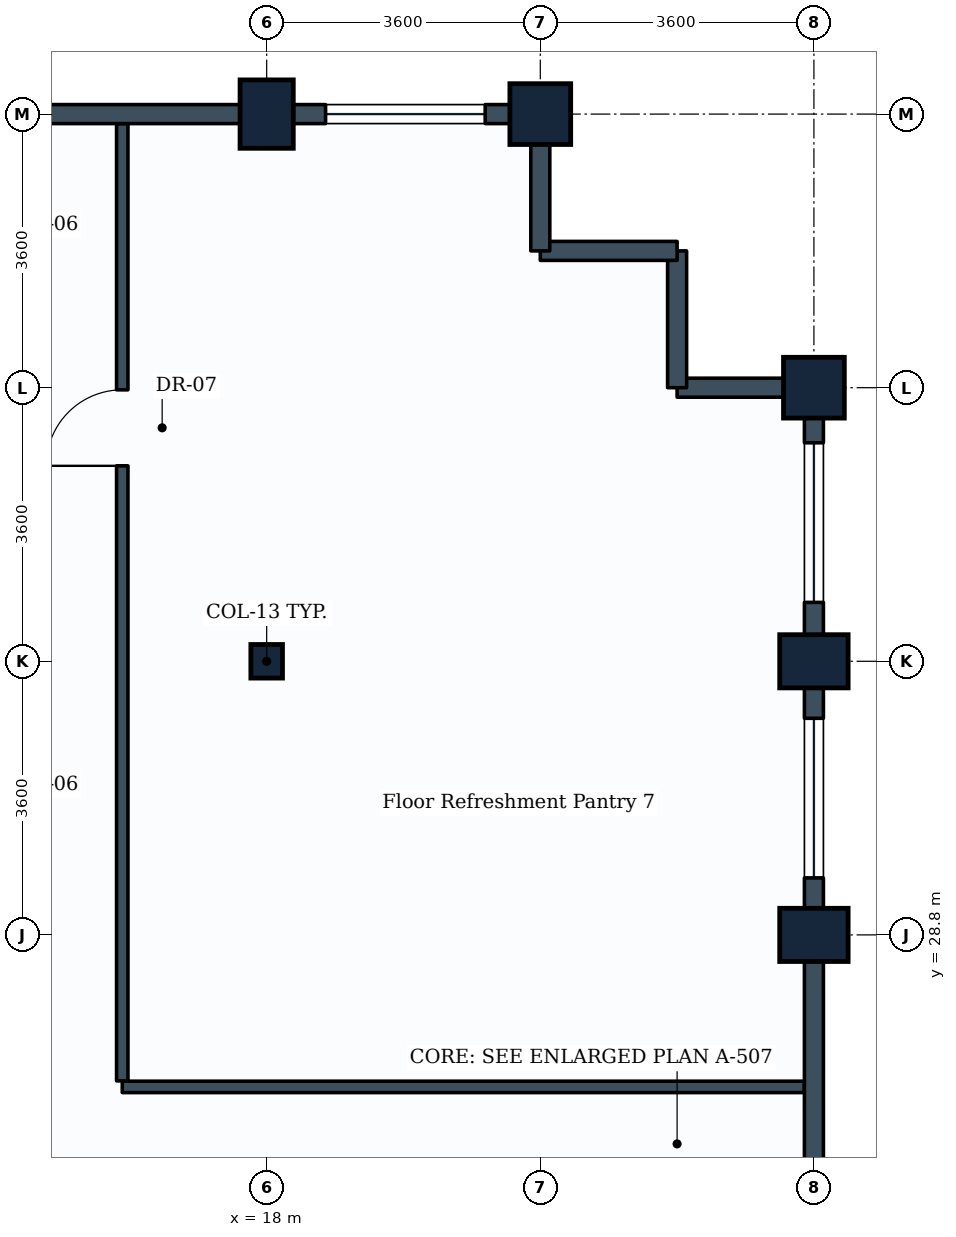
"""IFC4 building model, lengths in metres.
Left out: names, types, materials, properties, quantities, classifications, styles, units other than length and angle.
Written with IfcOpenShell. Run it as: python <this file> out.ifc"""

import sys

from ifc_helpers import new_model, si_unit, direction, frame, frame_2d, origin, origin_2d, place, context, subcontext, project, spatial, rectangle, i_section, extrude, element, fill, save


model = new_model("IFC4")
c1 = context("Model", 3, precision=1e-05, world=origin(), true_north=direction((0.0, 1.0)))
c2 = subcontext(c1, "Body", "Model", "MODEL_VIEW")
j1 = project(units=[si_unit("LENGTHUNIT", "METRE"), si_unit("PLANEANGLEUNIT", "RADIAN")], contexts=[c1])
p1 = place(None, origin())
s1 = spatial("IfcSite", under=j1, at=p1, CompositionType="ELEMENT")
p2 = place(p1, origin())
s2 = spatial("IfcBuilding", under=s1, at=p2, CompositionType="ELEMENT")
p3 = place(p2, frame((0.0, 0.0, 178.6)))
s3 = spatial("IfcBuildingStorey", under=s2, at=p3, CompositionType="ELEMENT", Elevation=178.6)
p4 = place(p3, frame((18.0, 32.4, 0.0), z_axis=(0.0, 0.0, 1.0), x_axis=(1.0, 0.0, 0.0)))
e1 = element("IfcColumn", 1, at=p4, inside=s3, PredefinedType="COLUMN", context=c2, shape_type="SweptSolid", body=[
    extrude(i_section(OverallWidth=0.416, OverallDepth=0.442, WebThickness=0.025, FlangeThickness=0.041, FilletRadius=0.015, at=origin_2d()), origin(), (0.0, 0.0, 1.0), 3.8),
])
p5 = place(p3, frame((18.0, 39.6, 0.0), z_axis=(0.0, 0.0, 1.0), x_axis=(1.0, 0.0, 0.0)))
e2 = element("IfcColumn", 2, at=p5, inside=s3, PredefinedType="COLUMN", context=c2, shape_type="SweptSolid", body=[
    extrude(rectangle(XDim=0.7, YDim=0.9, at=origin_2d()), origin(), (0.0, 0.0, 1.0), 3.8),
])
p6 = place(p3, frame((21.6, 39.6, 0.0), z_axis=(0.0, 0.0, 1.0), x_axis=(1.0, 0.0, 0.0)))
e3 = element("IfcColumn", 3, at=p6, inside=s3, PredefinedType="COLUMN", context=c2, shape_type="SweptSolid", body=[
    extrude(rectangle(XDim=0.8, YDim=0.8, at=origin_2d()), origin(), (0.0, 0.0, 1.0), 3.8),
])
for number, where, z_axis, x_axis in (
    (4, (25.2, 28.8, 0.0), (0.0, 0.0, 1.0), (0.0, 1.0, 0.0)),
    (5, (25.2, 32.4, 0.0), (0.0, 0.0, 1.0), (0.0, 1.0, 0.0)),
):
    element("IfcColumn", number, at=place(p3, frame(where, z_axis=z_axis, x_axis=x_axis)), inside=s3, PredefinedType="COLUMN", context=c2, shape_type="SweptSolid", body=[
        extrude(rectangle(XDim=0.7, YDim=0.9, at=origin_2d()), origin(), (0.0, 0.0, 1.0), 3.8),
    ])
p7 = place(p3, frame((25.2, 36.0, 0.0), z_axis=(0.0, 0.0, 1.0), x_axis=(0.0, 1.0, 0.0)))
e6 = element("IfcColumn", 6, at=p7, inside=s3, PredefinedType="COLUMN", context=c2, shape_type="SweptSolid", body=[
    extrude(rectangle(XDim=0.8, YDim=0.8, at=origin_2d()), origin(), (0.0, 0.0, 1.0), 3.8),
])
p8 = place(p3, frame((25.2, 25.2, 0.0), z_axis=(0.0, 0.0, 1.0), x_axis=(0.0, 1.0, 0.0)))
e7 = element("IfcWall", 7, at=p8, inside=s3, PredefinedType="STANDARD", context=c2, shape_type="SweptSolid", body=[
    extrude(rectangle(XDim=3.6, YDim=0.25, at=frame_2d((1.8, 0.0))), origin(), (0.0, 0.0, 1.0), 2.93),
])
p9 = place(p3, frame((25.2, 28.8, 0.0), z_axis=(0.0, 0.0, 1.0), x_axis=(0.0, 1.0, 0.0)))
e8 = element("IfcWall", 8, at=p9, inside=s3, PredefinedType="STANDARD", context=c2, shape_type="SweptSolid", body=[
    extrude(rectangle(XDim=3.6, YDim=0.25, at=frame_2d((1.8, 0.0))), origin(), (0.0, 0.0, 1.0), 2.93),
])
p10 = place(p9, frame((0.75, 0.0, 0.85)))
e9 = element("IfcOpeningElement", 9, at=p10, cuts=e8, PredefinedType="OPENING", context=c2, shape_type="SweptSolid", body=[
    extrude(rectangle(XDim=2.1, YDim=1.35, at=frame_2d((1.05, 0.675))), frame((0.0, 0.135, 0.0), z_axis=(0.0, -1.0, 0.0), x_axis=(1.0, 0.0, 0.0)), (0.0, 0.0, 1.0), 0.27),
])
p11 = place(p3, frame((25.2, 32.4, 0.0), z_axis=(0.0, 0.0, 1.0), x_axis=(0.0, 1.0, 0.0)))
e10 = element("IfcWall", 10, at=p11, inside=s3, PredefinedType="STANDARD", context=c2, shape_type="SweptSolid", body=[
    extrude(rectangle(XDim=3.6, YDim=0.25, at=frame_2d((1.8, 0.0))), origin(), (0.0, 0.0, 1.0), 2.93),
])
p12 = place(p11, frame((0.775, 0.0, 0.85)))
e11 = element("IfcOpeningElement", 11, at=p12, cuts=e10, PredefinedType="OPENING", context=c2, shape_type="SweptSolid", body=[
    extrude(rectangle(XDim=2.1, YDim=1.35, at=frame_2d((1.05, 0.675))), frame((0.0, 0.135, 0.0), z_axis=(0.0, -1.0, 0.0), x_axis=(1.0, 0.0, 0.0)), (0.0, 0.0, 1.0), 0.27),
])
p13 = place(p3, frame((23.4, 36.0, 0.0), z_axis=(0.0, 0.0, 1.0), x_axis=(1.0, 0.0, 0.0)))
e12 = element("IfcWall", 12, at=p13, inside=s3, PredefinedType="STANDARD", context=c2, shape_type="SweptSolid", body=[
    extrude(rectangle(XDim=1.8, YDim=0.25, at=frame_2d((0.9, 0.0))), origin(), (0.0, 0.0, 1.0), 2.93),
])
p14 = place(p3, frame((23.4, 36.0, 0.0), z_axis=(0.0, 0.0, 1.0), x_axis=(0.0, 1.0, 0.0)))
e13 = element("IfcWall", 13, at=p14, inside=s3, PredefinedType="STANDARD", context=c2, shape_type="SweptSolid", body=[
    extrude(rectangle(XDim=1.8, YDim=0.25, at=frame_2d((0.9, 0.0))), origin(), (0.0, 0.0, 1.0), 3.535),
])
p15 = place(p3, frame((21.6, 37.8, 0.0), z_axis=(0.0, 0.0, 1.0), x_axis=(1.0, 0.0, 0.0)))
e14 = element("IfcWall", 14, at=p15, inside=s3, PredefinedType="STANDARD", context=c2, shape_type="SweptSolid", body=[
    extrude(rectangle(XDim=1.8, YDim=0.25, at=frame_2d((0.9, 0.0))), origin(), (0.0, 0.0, 1.0), 3.535),
])
p16 = place(p3, frame((21.6, 37.8, 0.0), z_axis=(0.0, 0.0, 1.0), x_axis=(0.0, 1.0, 0.0)))
e15 = element("IfcWall", 15, at=p16, inside=s3, PredefinedType="STANDARD", context=c2, shape_type="SweptSolid", body=[
    extrude(rectangle(XDim=1.8, YDim=0.25, at=frame_2d((0.9, 0.0))), origin(), (0.0, 0.0, 1.0), 2.93),
])
p17 = place(p3, frame((18.0, 39.6, 0.0), z_axis=(0.0, 0.0, 1.0), x_axis=(1.0, 0.0, 0.0)))
e16 = element("IfcWall", 16, at=p17, inside=s3, PredefinedType="STANDARD", context=c2, shape_type="SweptSolid", body=[
    extrude(rectangle(XDim=3.6, YDim=0.25, at=frame_2d((1.8, 0.0))), origin(), (0.0, 0.0, 1.0), 2.93),
])
p18 = place(p17, frame((0.775, 0.0, 0.85)))
e17 = element("IfcOpeningElement", 17, at=p18, cuts=e16, PredefinedType="OPENING", context=c2, shape_type="SweptSolid", body=[
    extrude(rectangle(XDim=2.1, YDim=1.35, at=frame_2d((1.05, 0.675))), frame((0.0, 0.135, 0.0), z_axis=(0.0, -1.0, 0.0), x_axis=(1.0, 0.0, 0.0)), (0.0, 0.0, 1.0), 0.27),
])
p19 = place(p3, frame((14.4, 39.6, 0.0), z_axis=(0.0, 0.0, 1.0), x_axis=(1.0, 0.0, 0.0)))
e18 = element("IfcWall", 18, at=p19, inside=s3, PredefinedType="STANDARD", context=c2, shape_type="SweptSolid", body=[
    extrude(rectangle(XDim=3.6, YDim=0.25, at=frame_2d((1.8, 0.0))), origin(), (0.0, 0.0, 1.0), 2.93),
])
p20 = place(p3, frame((16.1, 26.8, 0.0), z_axis=(0.0, 0.0, 1.0), x_axis=(1.0, 0.0, 0.0)))
e19 = element("IfcWall", 19, at=p20, inside=s3, PredefinedType="PARTITIONING", context=c2, shape_type="SweptSolid", body=[
    extrude(rectangle(XDim=8.971, YDim=0.15, at=frame_2d((4.485, 0.0))), origin(), (0.0, 0.0, 1.0), 2.93),
])
p21 = place(p3, frame((16.1, 26.879, 0.0), z_axis=(0.0, 0.0, 1.0), x_axis=(0.0, 1.0, 0.0)))
e20 = element("IfcWall", 20, at=p21, inside=s3, PredefinedType="PARTITIONING", context=c2, shape_type="SweptSolid", body=[
    extrude(rectangle(XDim=12.592, YDim=0.15, at=frame_2d((6.296, 0.0))), origin(), (0.0, 0.0, 1.0), 2.93),
])
p22 = place(p21, frame((8.093, 0.0, 0.0)))
e21 = element("IfcOpeningElement", 21, at=p22, cuts=e20, PredefinedType="OPENING", context=c2, shape_type="SweptSolid", body=[
    extrude(rectangle(XDim=1.0, YDim=2.1, at=frame_2d((0.5, 1.05))), frame((0.0, 0.085, 0.0), z_axis=(0.0, -1.0, 0.0), x_axis=(1.0, 0.0, 0.0)), (0.0, 0.0, 1.0), 0.17),
])
p23 = place(p10, origin())
e22 = element("IfcWindow", 22, at=p23, inside=s3, PartitioningType="SINGLE_PANEL", PredefinedType="WINDOW", context=c2, shape_type="SweptSolid", body=[
    extrude(rectangle(XDim=2.1, YDim=1.35, at=frame_2d((1.05, 0.675))), frame((0.0, 0.03, 0.0), z_axis=(0.0, -1.0, 0.0), x_axis=(1.0, 0.0, 0.0)), (0.0, 0.0, 1.0), 0.06),
])
fill(e9, e22)
p24 = place(p12, origin())
e23 = element("IfcWindow", 23, at=p24, inside=s3, PartitioningType="SINGLE_PANEL", PredefinedType="WINDOW", context=c2, shape_type="SweptSolid", body=[
    extrude(rectangle(XDim=2.1, YDim=1.35, at=frame_2d((1.05, 0.675))), frame((0.0, 0.03, 0.0), z_axis=(0.0, -1.0, 0.0), x_axis=(1.0, 0.0, 0.0)), (0.0, 0.0, 1.0), 0.06),
])
fill(e11, e23)
p25 = place(p18, origin())
e24 = element("IfcWindow", 24, at=p25, inside=s3, PartitioningType="SINGLE_PANEL", PredefinedType="WINDOW", context=c2, shape_type="SweptSolid", body=[
    extrude(rectangle(XDim=2.1, YDim=1.35, at=frame_2d((1.05, 0.675))), frame((0.0, 0.03, 0.0), z_axis=(0.0, -1.0, 0.0), x_axis=(1.0, 0.0, 0.0)), (0.0, 0.0, 1.0), 0.06),
])
fill(e17, e24)
p26 = place(p22, origin())
e25 = element("IfcDoor", 25, at=p26, inside=s3, OperationType="SINGLE_SWING_LEFT", PredefinedType="DOOR", context=c2, shape_type="SweptSolid", body=[
    extrude(rectangle(XDim=1.0, YDim=2.1, at=frame_2d((0.5, 1.05))), frame((0.0, 0.025, 0.0), z_axis=(0.0, -1.0, 0.0), x_axis=(1.0, 0.0, 0.0)), (0.0, 0.0, 1.0), 0.05),
])
fill(e21, e25)
save(model, sys.argv[1])
